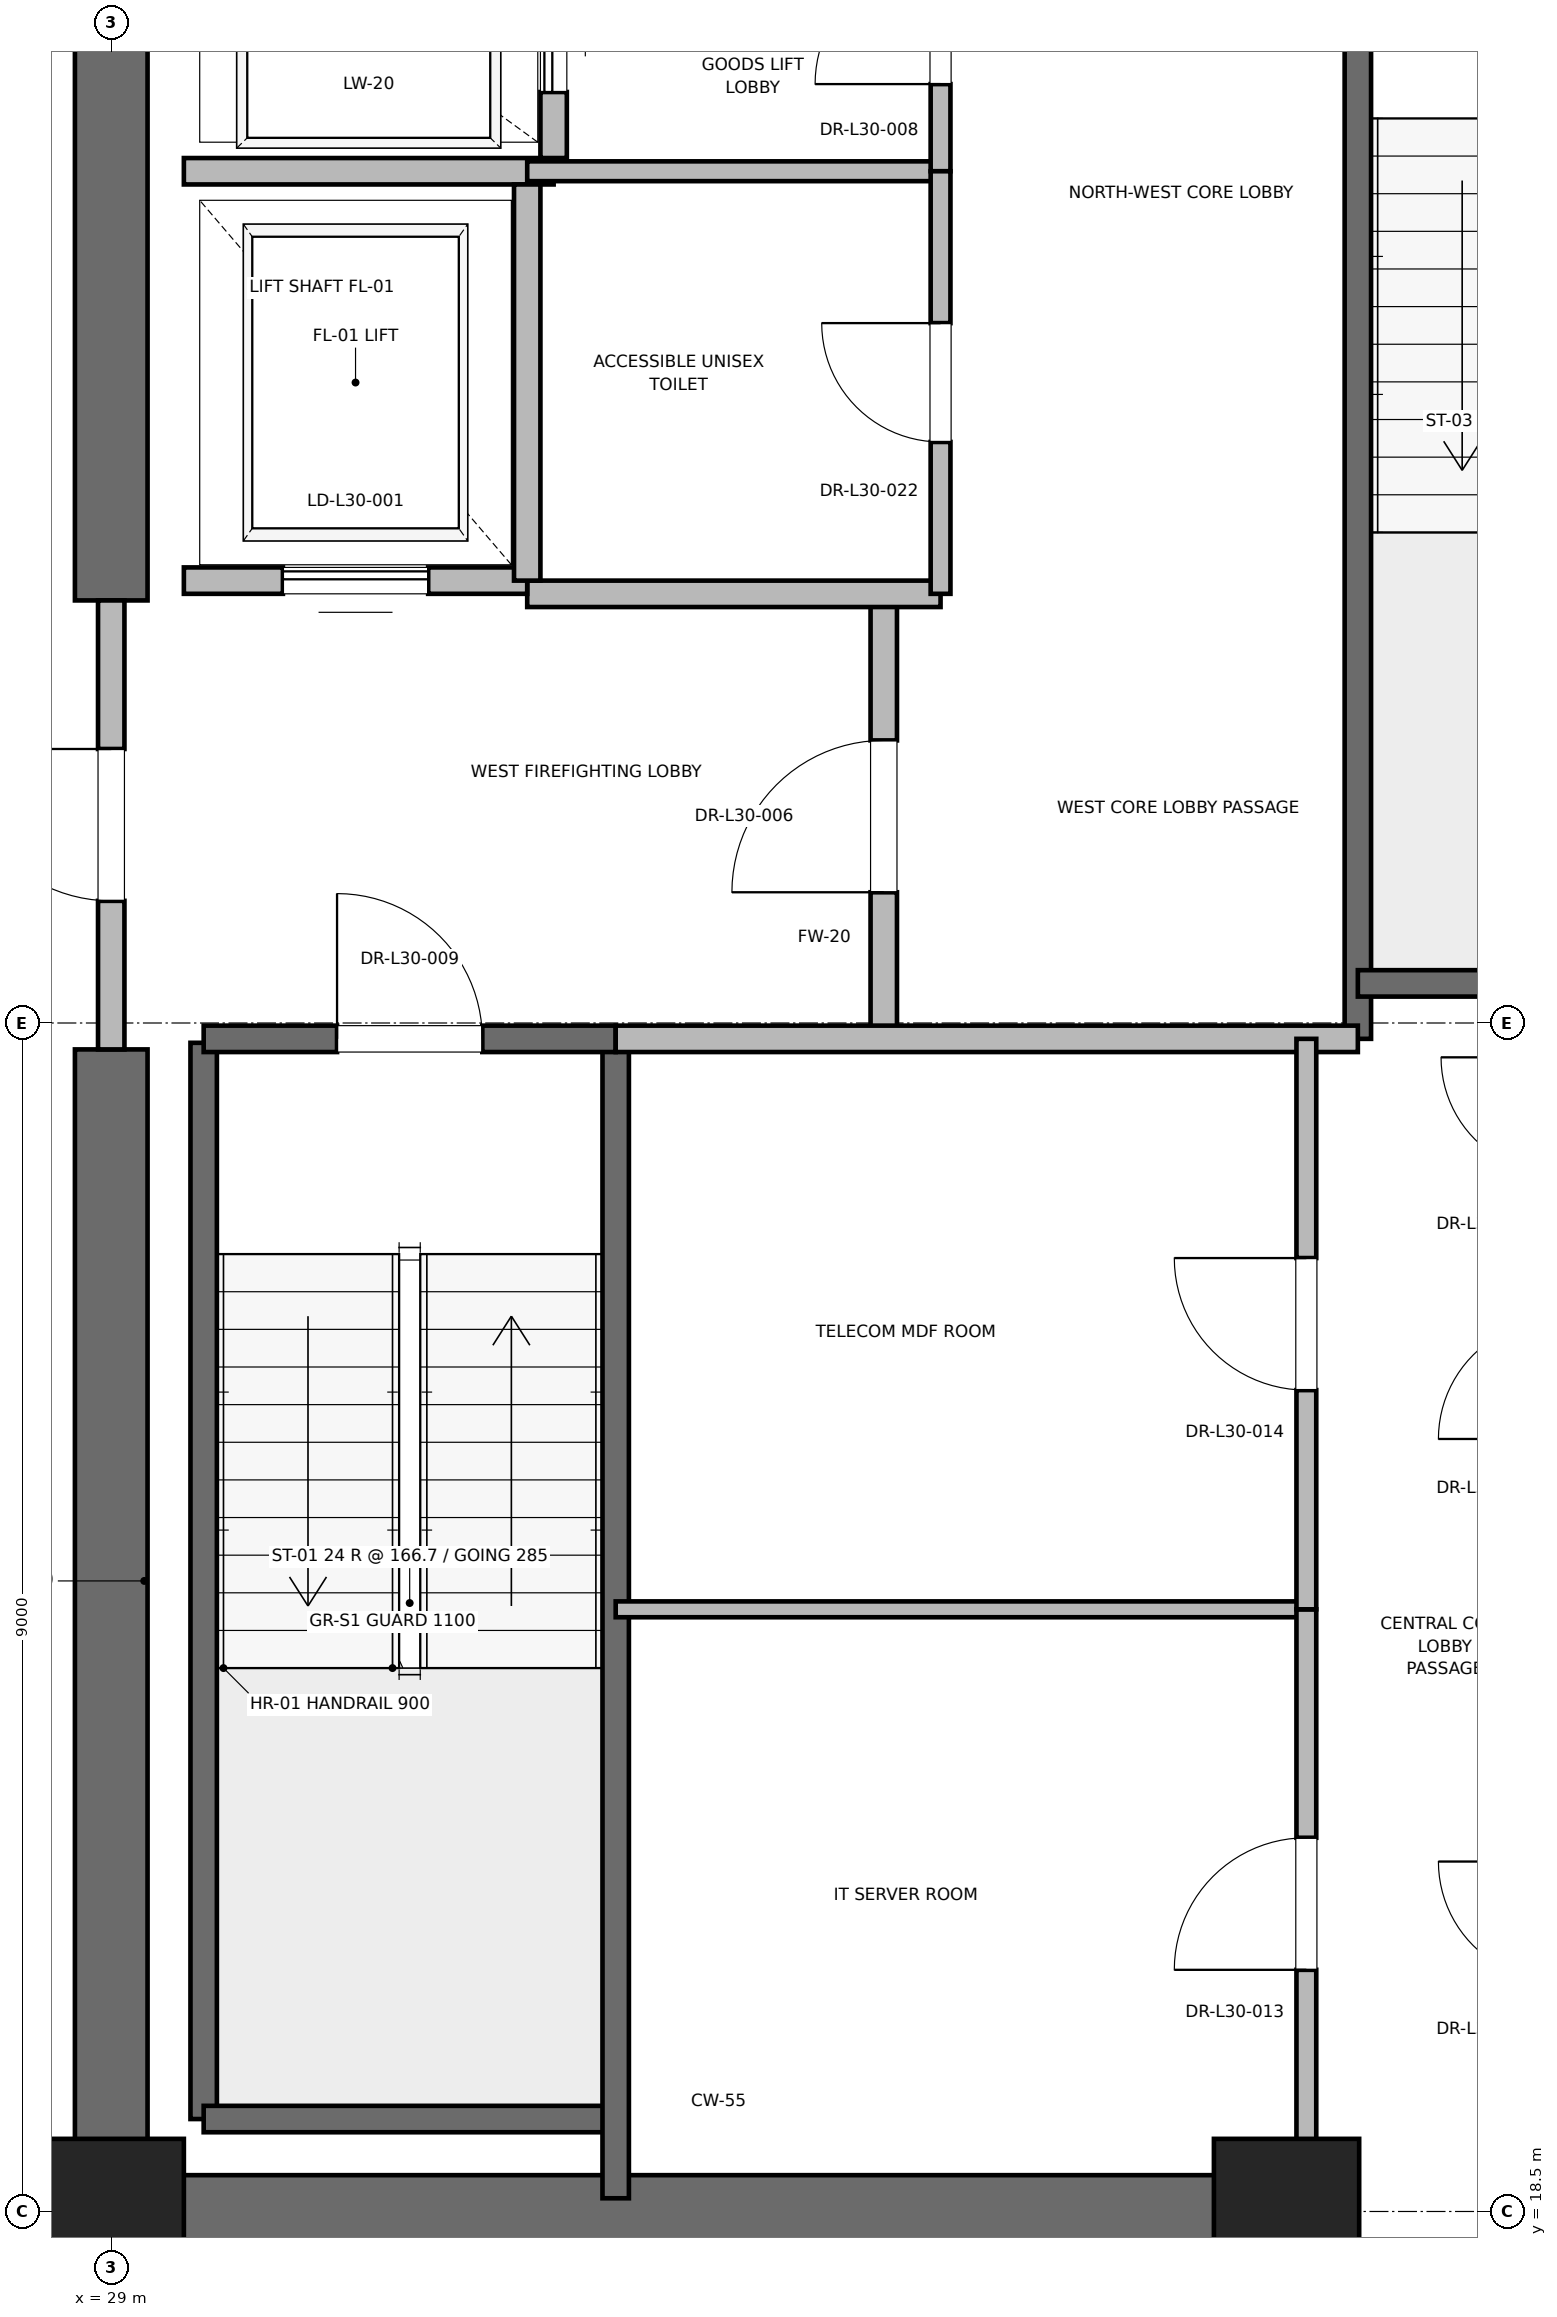
"""IFC4 building model, lengths in metres.
Left out: names, types, materials, properties, quantities, classifications, styles, units other than length and angle.
Written with IfcOpenShell. Run it as: python <this file> out.ifc"""

import sys

from ifc_helpers import new_model, si_unit, direction, frame, frame_2d, origin, origin_2d, place, context, subcontext, project, spatial, rectangle, extrude, element, fill, save


model = new_model("IFC4")
c1 = context("Model", 3, precision=1e-05, world=origin(), true_north=direction((0.0, 1.0)))
c2 = subcontext(c1, "Body", "Model", "MODEL_VIEW")
j1 = project(units=[si_unit("LENGTHUNIT", "METRE"), si_unit("PLANEANGLEUNIT", "RADIAN")], contexts=[c1])
p1 = place(None, origin())
s1 = spatial("IfcSite", under=j1, at=p1, CompositionType="ELEMENT")
p2 = place(p1, origin())
s2 = spatial("IfcBuilding", under=s1, at=p2, CompositionType="ELEMENT")
p3 = place(p2, frame((0.0, 0.0, 132.4)))
s3 = spatial("IfcBuildingStorey", under=s2, at=p3, CompositionType="ELEMENT", Elevation=132.4)
for number, where, z_axis, x_axis in (
    (1, (29.0, 18.5, 0.0), (0.0, 0.0, 1.0), (1.0, 0.0, 0.0)),
    (2, (37.9, 18.5, 0.0), (0.0, 0.0, 1.0), (1.0, 0.0, 0.0)),
):
    element("IfcColumn", number, at=place(p3, frame(where, z_axis=z_axis, x_axis=x_axis)), inside=s3, PredefinedType="PILASTER", context=c2, shape_type="SweptSolid", body=[
        extrude(rectangle(XDim=1.1, YDim=1.1, at=origin_2d()), origin(), (0.0, 0.0, 1.0), 4.0),
    ])
p4 = place(p3, frame((29.0, 18.5, 0.0), z_axis=(0.0, 0.0, 1.0), x_axis=(1.0, 0.0, 0.0)))
e3 = element("IfcWall", 3, at=p4, inside=s3, PredefinedType="SHEAR", context=c2, shape_type="SweptSolid", body=[
    extrude(rectangle(XDim=9.2, YDim=0.55, at=frame_2d((4.6, 0.0))), origin(), (0.0, 0.0, 1.0), 3.775),
])
p5 = place(p3, frame((29.0, 18.5, 0.0), z_axis=(0.0, 0.0, 1.0), x_axis=(0.0, 1.0, 0.0)))
e4 = element("IfcWall", 4, at=p5, inside=s3, PredefinedType="SHEAR", context=c2, shape_type="SweptSolid", body=[
    extrude(rectangle(XDim=8.8, YDim=0.55, at=frame_2d((4.4, 0.0))), origin(), (0.0, 0.0, 1.0), 3.775),
])
p6 = place(p3, frame((29.0, 30.7, 0.0), z_axis=(0.0, 0.0, 1.0), x_axis=(0.0, 1.0, 0.0)))
e5 = element("IfcWall", 5, at=p6, inside=s3, PredefinedType="SHEAR", context=c2, shape_type="SweptSolid", body=[
    extrude(rectangle(XDim=5.8, YDim=0.55, at=frame_2d((2.9, 0.0))), origin(), (0.0, 0.0, 1.0), 3.775),
])
p7 = place(p3, frame((29.7, 19.2, 0.0), z_axis=(0.0, 0.0, 1.0), x_axis=(0.0, 1.0, 0.0)))
e6 = element("IfcWall", 6, at=p7, inside=s3, PredefinedType="SOLIDWALL", context=c2, shape_type="SweptSolid", body=[
    extrude(rectangle(XDim=8.15, YDim=0.2, at=frame_2d((4.075, 0.0))), origin(), (0.0, 0.0, 1.0), 3.775),
])
p8 = place(p3, frame((29.7, 19.2, 0.0), z_axis=(0.0, 0.0, 1.0), x_axis=(1.0, 0.0, 0.0)))
e7 = element("IfcWall", 7, at=p8, inside=s3, PredefinedType="SOLIDWALL", context=c2, shape_type="SweptSolid", body=[
    extrude(rectangle(XDim=3.12, YDim=0.2, at=frame_2d((1.56, 0.0))), origin(), (0.0, 0.0, 1.0), 3.775),
])
p9 = place(p3, frame((32.82, 18.6, 0.0), z_axis=(0.0, 0.0, 1.0), x_axis=(0.0, 1.0, 0.0)))
e8 = element("IfcWall", 8, at=p9, inside=s3, PredefinedType="SOLIDWALL", context=c2, shape_type="SweptSolid", body=[
    extrude(rectangle(XDim=8.78, YDim=0.2, at=frame_2d((4.39, 0.0))), origin(), (0.0, 0.0, 1.0), 3.775),
])
p10 = place(p3, frame((29.7, 27.38, 0.0), z_axis=(0.0, 0.0, 1.0), x_axis=(1.0, 0.0, 0.0)))
e9 = element("IfcWall", 9, at=p10, inside=s3, PredefinedType="SOLIDWALL", context=c2, shape_type="SweptSolid", body=[
    extrude(rectangle(XDim=3.12, YDim=0.2, at=frame_2d((1.56, 0.0))), origin(), (0.0, 0.0, 1.0), 3.775),
])
p11 = place(p10, frame((1.01, 0.0, 0.0)))
e10 = element("IfcOpeningElement", 10, at=p11, cuts=e9, PredefinedType="OPENING", context=c2, shape_type="SweptSolid", body=[
    extrude(rectangle(XDim=1.1, YDim=2.15, at=frame_2d((0.55, 1.075))), frame((0.0, 0.1, 0.0), z_axis=(0.0, -1.0, 0.0), x_axis=(1.0, 0.0, 0.0)), (0.0, 0.0, 1.0), 0.2),
])
p12 = place(p3, frame((38.44, 27.38, 0.0), z_axis=(0.0, 0.0, 1.0), x_axis=(0.0, 1.0, 0.0)))
e11 = element("IfcWall", 11, at=p12, inside=s3, PredefinedType="SOLIDWALL", context=c2, shape_type="SweptSolid", body=[
    extrude(rectangle(XDim=8.87, YDim=0.2, at=frame_2d((4.435, 0.0))), origin(), (0.0, 0.0, 1.0), 3.775),
])
p13 = place(p3, frame((38.44, 27.8, 0.0), z_axis=(0.0, 0.0, 1.0), x_axis=(1.0, 0.0, 0.0)))
e12 = element("IfcWall", 12, at=p13, inside=s3, PredefinedType="SOLIDWALL", context=c2, shape_type="SweptSolid", body=[
    extrude(rectangle(XDim=3.32, YDim=0.2, at=frame_2d((1.66, 0.0))), origin(), (0.0, 0.0, 1.0), 3.775),
])
p14 = place(p3, frame((34.85, 27.38, 0.0), z_axis=(0.0, 0.0, 1.0), x_axis=(0.0, 1.0, 0.0)))
e13 = element("IfcWall", 13, at=p14, inside=s3, PredefinedType="PARTITIONING", context=c2, shape_type="SweptSolid", body=[
    extrude(rectangle(XDim=3.37, YDim=0.2, at=frame_2d((1.685, 0.0))), origin(), (0.0, 0.0, 1.0), 3.775),
])
p15 = place(p14, frame((1.11, 0.0, 0.0)))
e14 = element("IfcOpeningElement", 14, at=p15, cuts=e13, PredefinedType="OPENING", context=c2, shape_type="SweptSolid", body=[
    extrude(rectangle(XDim=1.15, YDim=2.2, at=frame_2d((0.575, 1.1))), frame((0.0, 0.1, 0.0), z_axis=(0.0, -1.0, 0.0), x_axis=(1.0, 0.0, 0.0)), (0.0, 0.0, 1.0), 0.2),
])
p16 = place(p3, frame((29.0, 27.3, 0.0), z_axis=(0.0, 0.0, 1.0), x_axis=(0.0, 1.0, 0.0)))
e15 = element("IfcWall", 15, at=p16, inside=s3, PredefinedType="PARTITIONING", context=c2, shape_type="SweptSolid", body=[
    extrude(rectangle(XDim=3.4, YDim=0.2, at=frame_2d((1.7, 0.0))), origin(), (0.0, 0.0, 1.0), 2.755),
])
p17 = place(p16, frame((1.125, 0.0, 0.0)))
e16 = element("IfcOpeningElement", 16, at=p17, cuts=e15, PredefinedType="OPENING", context=c2, shape_type="SweptSolid", body=[
    extrude(rectangle(XDim=1.15, YDim=2.2, at=frame_2d((0.575, 1.1))), frame((0.0, 0.1, 0.0), z_axis=(0.0, -1.0, 0.0), x_axis=(1.0, 0.0, 0.0)), (0.0, 0.0, 1.0), 0.2),
])
p18 = place(p3, frame((32.82, 27.38, 0.0), z_axis=(0.0, 0.0, 1.0), x_axis=(1.0, 0.0, 0.0)))
e17 = element("IfcWall", 17, at=p18, inside=s3, PredefinedType="PARTITIONING", context=c2, shape_type="SweptSolid", body=[
    extrude(rectangle(XDim=5.62, YDim=0.2, at=frame_2d((2.81, 0.0))), origin(), (0.0, 0.0, 1.0), 3.775),
])
p19 = place(p3, frame((32.15, 30.75, 0.0), z_axis=(0.0, 0.0, 1.0), x_axis=(1.0, 0.0, 0.0)))
e18 = element("IfcWall", 18, at=p19, inside=s3, PredefinedType="PARTITIONING", context=c2, shape_type="SweptSolid", body=[
    extrude(rectangle(XDim=3.13, YDim=0.2, at=frame_2d((1.565, 0.0))), origin(), (0.0, 0.0, 1.0), 3.775),
])
p20 = place(p3, frame((29.55, 30.85, 0.0), z_axis=(0.0, 0.0, 1.0), x_axis=(1.0, 0.0, 0.0)))
e19 = element("IfcWall", 19, at=p20, inside=s3, PredefinedType="SOLIDWALL", context=c2, shape_type="SweptSolid", body=[
    extrude(rectangle(XDim=2.6, YDim=0.2, at=frame_2d((1.3, 0.0))), origin(), (0.0, 0.0, 1.0), 2.755),
])
p21 = place(p20, frame((0.75, 0.0, 0.0)))
e20 = element("IfcOpeningElement", 20, at=p21, cuts=e19, PredefinedType="OPENING", context=c2, shape_type="SweptSolid", body=[
    extrude(rectangle(XDim=1.1, YDim=2.2, at=frame_2d((0.55, 1.1))), frame((0.0, 0.1, 0.0), z_axis=(0.0, -1.0, 0.0), x_axis=(1.0, 0.0, 0.0)), (0.0, 0.0, 1.0), 0.2),
])
p22 = place(p3, frame((29.55, 33.95, 0.0), z_axis=(0.0, 0.0, 1.0), x_axis=(1.0, 0.0, 0.0)))
e21 = element("IfcWall", 21, at=p22, inside=s3, PredefinedType="SOLIDWALL", context=c2, shape_type="SweptSolid", body=[
    extrude(rectangle(XDim=2.8, YDim=0.2, at=frame_2d((1.4, 0.0))), origin(), (0.0, 0.0, 1.0), 3.775),
])
p23 = place(p3, frame((32.15, 30.85, 0.0), z_axis=(0.0, 0.0, 1.0), x_axis=(0.0, 1.0, 0.0)))
e22 = element("IfcWall", 22, at=p23, inside=s3, PredefinedType="SOLIDWALL", context=c2, shape_type="SweptSolid", body=[
    extrude(rectangle(XDim=3.0, YDim=0.2, at=frame_2d((1.5, 0.0))), origin(), (0.0, 0.0, 1.0), 3.775),
])
p24 = place(p3, frame((32.35, 34.05, 0.0), z_axis=(0.0, 0.0, 1.0), x_axis=(0.0, 1.0, 0.0)))
e23 = element("IfcWall", 23, at=p24, inside=s3, PredefinedType="SOLIDWALL", context=c2, shape_type="SweptSolid", body=[
    extrude(rectangle(XDim=2.1, YDim=0.2, at=frame_2d((1.05, 0.0))), origin(), (0.0, 0.0, 1.0), 3.775),
])
p25 = place(p24, frame((0.5, 0.0, 0.0)))
e24 = element("IfcOpeningElement", 24, at=p25, cuts=e23, PredefinedType="OPENING", context=c2, shape_type="SweptSolid", body=[
    extrude(rectangle(XDim=1.1, YDim=2.2, at=frame_2d((0.55, 1.1))), frame((0.0, 0.1, 0.0), z_axis=(0.0, -1.0, 0.0), x_axis=(1.0, 0.0, 0.0)), (0.0, 0.0, 1.0), 0.2),
])
p26 = place(p3, frame((32.15, 33.95, 0.0), z_axis=(0.0, 0.0, 1.0), x_axis=(1.0, 0.0, 0.0)))
e25 = element("IfcWall", 25, at=p26, inside=s3, PredefinedType="PARTITIONING", context=c2, shape_type="SweptSolid", body=[
    extrude(rectangle(XDim=3.13, YDim=0.15, at=frame_2d((1.565, 0.0))), origin(), (0.0, 0.0, 1.0), 2.85),
])
p27 = place(p3, frame((35.28, 33.95, 0.0), z_axis=(0.0, 0.0, 1.0), x_axis=(0.0, 1.0, 0.0)))
e26 = element("IfcWall", 26, at=p27, inside=s3, PredefinedType="PARTITIONING", context=c2, shape_type="SweptSolid", body=[
    extrude(rectangle(XDim=2.27, YDim=0.15, at=frame_2d((1.135, 0.0))), origin(), (0.0, 0.0, 1.0), 2.755),
])
p28 = place(p27, frame((0.66, 0.0, 0.0)))
e27 = element("IfcOpeningElement", 27, at=p28, cuts=e26, PredefinedType="OPENING", context=c2, shape_type="SweptSolid", body=[
    extrude(rectangle(XDim=0.95, YDim=2.15, at=frame_2d((0.475, 1.075))), frame((0.0, 0.075, 0.0), z_axis=(0.0, -1.0, 0.0), x_axis=(1.0, 0.0, 0.0)), (0.0, 0.0, 1.0), 0.15),
])
p29 = place(p3, frame((35.28, 30.75, 0.0), z_axis=(0.0, 0.0, 1.0), x_axis=(0.0, 1.0, 0.0)))
e28 = element("IfcWall", 28, at=p29, inside=s3, PredefinedType="PARTITIONING", context=c2, shape_type="SweptSolid", body=[
    extrude(rectangle(XDim=3.2, YDim=0.15, at=frame_2d((1.6, 0.0))), origin(), (0.0, 0.0, 1.0), 2.85),
])
p30 = place(p29, frame((1.15, 0.0, 0.0)))
e29 = element("IfcOpeningElement", 29, at=p30, cuts=e28, PredefinedType="OPENING", context=c2, shape_type="SweptSolid", body=[
    extrude(rectangle(XDim=0.9, YDim=2.1, at=frame_2d((0.45, 1.05))), frame((0.0, 0.075, 0.0), z_axis=(0.0, -1.0, 0.0), x_axis=(1.0, 0.0, 0.0)), (0.0, 0.0, 1.0), 0.15),
])
p31 = place(p3, frame((32.82, 23.06, 0.0), z_axis=(0.0, 0.0, 1.0), x_axis=(1.0, 0.0, 0.0)))
e30 = element("IfcWall", 30, at=p31, inside=s3, PredefinedType="PARTITIONING", context=c2, shape_type="SweptSolid", body=[
    extrude(rectangle(XDim=5.23, YDim=0.12, at=frame_2d((2.615, 0.0))), origin(), (0.0, 0.0, 1.0), 2.85),
])
p32 = place(p3, frame((38.05, 18.6, 0.0), z_axis=(0.0, 0.0, 1.0), x_axis=(0.0, 1.0, 0.0)))
e31 = element("IfcWall", 31, at=p32, inside=s3, PredefinedType="PARTITIONING", context=c2, shape_type="SweptSolid", body=[
    extrude(rectangle(XDim=4.46, YDim=0.15, at=frame_2d((2.23, 0.0))), origin(), (0.0, 0.0, 1.0), 2.755),
])
p33 = place(p32, frame((1.73, 0.0, 0.0)))
e32 = element("IfcOpeningElement", 32, at=p33, cuts=e31, PredefinedType="OPENING", context=c2, shape_type="SweptSolid", body=[
    extrude(rectangle(XDim=1.0, YDim=2.15, at=frame_2d((0.5, 1.075))), frame((0.0, 0.075, 0.0), z_axis=(0.0, -1.0, 0.0), x_axis=(1.0, 0.0, 0.0)), (0.0, 0.0, 1.0), 0.15),
])
p34 = place(p3, frame((38.05, 23.06, 0.0), z_axis=(0.0, 0.0, 1.0), x_axis=(0.0, 1.0, 0.0)))
e33 = element("IfcWall", 33, at=p34, inside=s3, PredefinedType="PARTITIONING", context=c2, shape_type="SweptSolid", body=[
    extrude(rectangle(XDim=4.32, YDim=0.15, at=frame_2d((2.16, 0.0))), origin(), (0.0, 0.0, 1.0), 2.85),
])
p35 = place(p34, frame((1.66, 0.0, 0.0)))
e34 = element("IfcOpeningElement", 34, at=p35, cuts=e33, PredefinedType="OPENING", context=c2, shape_type="SweptSolid", body=[
    extrude(rectangle(XDim=1.0, YDim=2.15, at=frame_2d((0.5, 1.075))), frame((0.0, 0.075, 0.0), z_axis=(0.0, -1.0, 0.0), x_axis=(1.0, 0.0, 0.0)), (0.0, 0.0, 1.0), 0.15),
])
p36 = place(p11, origin())
e35 = element("IfcDoor", 35, at=p36, inside=s3, OperationType="SINGLE_SWING_LEFT", PredefinedType="DOOR", context=c2, shape_type="SweptSolid", body=[
    extrude(rectangle(XDim=1.1, YDim=2.15, at=frame_2d((0.55, 1.075))), frame((0.0, 0.025, 0.0), z_axis=(0.0, -1.0, 0.0), x_axis=(1.0, 0.0, 0.0)), (0.0, 0.0, 1.0), 0.05),
])
fill(e10, e35)
p37 = place(p15, origin())
e36 = element("IfcDoor", 36, at=p37, inside=s3, OperationType="SINGLE_SWING_LEFT", PredefinedType="DOOR", context=c2, shape_type="SweptSolid", body=[
    extrude(rectangle(XDim=1.15, YDim=2.2, at=frame_2d((0.575, 1.1))), frame((0.0, 0.025, 0.0), z_axis=(0.0, -1.0, 0.0), x_axis=(1.0, 0.0, 0.0)), (0.0, 0.0, 1.0), 0.05),
])
fill(e14, e36)
p38 = place(p17, origin())
e37 = element("IfcDoor", 37, at=p38, inside=s3, OperationType="SINGLE_SWING_RIGHT", PredefinedType="DOOR", context=c2, shape_type="SweptSolid", body=[
    extrude(rectangle(XDim=1.15, YDim=2.2, at=frame_2d((0.575, 1.1))), frame((0.0, 0.025, 0.0), z_axis=(0.0, -1.0, 0.0), x_axis=(1.0, 0.0, 0.0)), (0.0, 0.0, 1.0), 0.05),
])
fill(e16, e37)
p39 = place(p21, origin())
e38 = element("IfcDoor", 38, at=p39, inside=s3, OperationType="SLIDING_TO_RIGHT", PredefinedType="DOOR", context=c2, shape_type="SweptSolid", body=[
    extrude(rectangle(XDim=1.1, YDim=2.2, at=frame_2d((0.55, 1.1))), frame((0.0, 0.025, 0.0), z_axis=(0.0, -1.0, 0.0), x_axis=(1.0, 0.0, 0.0)), (0.0, 0.0, 1.0), 0.05),
])
fill(e20, e38)
p40 = place(p25, origin())
e39 = element("IfcDoor", 39, at=p40, inside=s3, OperationType="SLIDING_TO_RIGHT", PredefinedType="DOOR", context=c2, shape_type="SweptSolid", body=[
    extrude(rectangle(XDim=1.1, YDim=2.2, at=frame_2d((0.55, 1.1))), frame((0.0, 0.025, 0.0), z_axis=(0.0, -1.0, 0.0), x_axis=(1.0, 0.0, 0.0)), (0.0, 0.0, 1.0), 0.05),
])
fill(e24, e39)
p41 = place(p28, origin())
e40 = element("IfcDoor", 40, at=p41, inside=s3, OperationType="SINGLE_SWING_LEFT", PredefinedType="DOOR", context=c2, shape_type="SweptSolid", body=[
    extrude(rectangle(XDim=0.95, YDim=2.15, at=frame_2d((0.475, 1.075))), frame((0.0, 0.025, 0.0), z_axis=(0.0, -1.0, 0.0), x_axis=(1.0, 0.0, 0.0)), (0.0, 0.0, 1.0), 0.05),
])
fill(e27, e40)
p42 = place(p30, origin())
e41 = element("IfcDoor", 41, at=p42, inside=s3, OperationType="SINGLE_SWING_RIGHT", PredefinedType="DOOR", context=c2, shape_type="SweptSolid", body=[
    extrude(rectangle(XDim=0.9, YDim=2.1, at=frame_2d((0.45, 1.05))), frame((0.0, 0.025, 0.0), z_axis=(0.0, -1.0, 0.0), x_axis=(1.0, 0.0, 0.0)), (0.0, 0.0, 1.0), 0.05),
])
fill(e29, e41)
p43 = place(p33, origin())
e42 = element("IfcDoor", 42, at=p43, inside=s3, OperationType="SINGLE_SWING_LEFT", PredefinedType="DOOR", context=c2, shape_type="SweptSolid", body=[
    extrude(rectangle(XDim=1.0, YDim=2.15, at=frame_2d((0.5, 1.075))), frame((0.0, 0.025, 0.0), z_axis=(0.0, -1.0, 0.0), x_axis=(1.0, 0.0, 0.0)), (0.0, 0.0, 1.0), 0.05),
])
fill(e32, e42)
p44 = place(p35, origin())
e43 = element("IfcDoor", 43, at=p44, inside=s3, OperationType="SINGLE_SWING_RIGHT", PredefinedType="DOOR", context=c2, shape_type="SweptSolid", body=[
    extrude(rectangle(XDim=1.0, YDim=2.15, at=frame_2d((0.5, 1.075))), frame((0.0, 0.025, 0.0), z_axis=(0.0, -1.0, 0.0), x_axis=(1.0, 0.0, 0.0)), (0.0, 0.0, 1.0), 0.05),
])
fill(e34, e43)
save(model, sys.argv[1])
